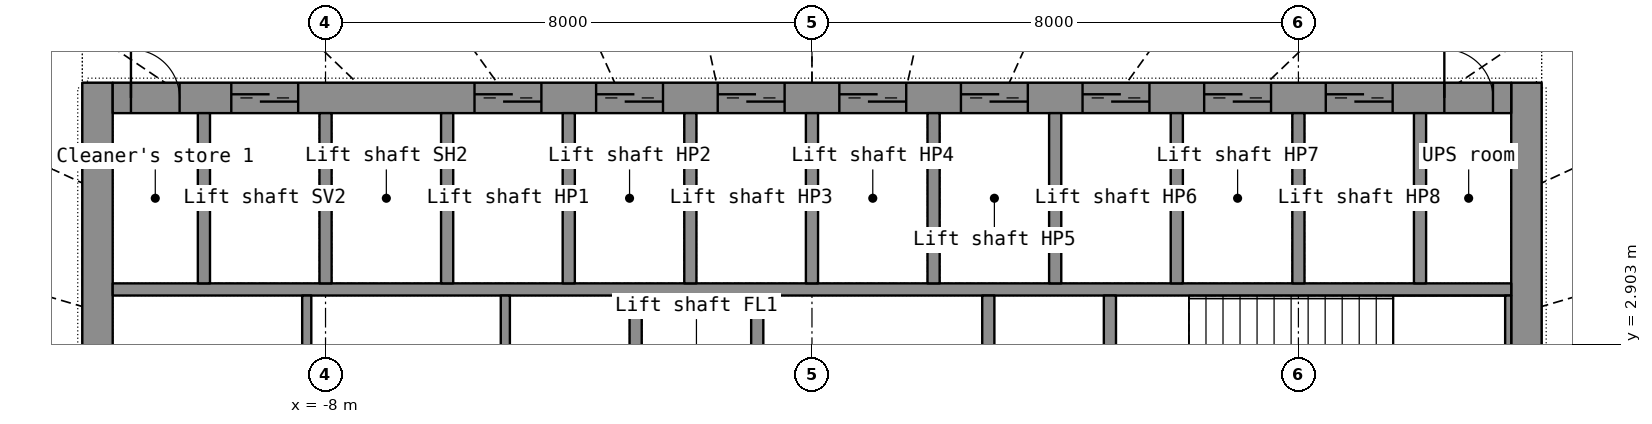
"""IFC4 building model, lengths in metres.
Left out: names, types, materials, properties, quantities, classifications, styles, units other than length and angle.
Written with IfcOpenShell. Run it as: python <this file> out.ifc"""

import sys

from ifc_helpers import new_model, si_unit, direction, frame, frame_2d, origin, place, context, subcontext, project, spatial, rectangle, extrude, element, fill, save


model = new_model("IFC4")
c1 = context("Model", 3, precision=1e-05, world=origin(), true_north=direction((0.0, 1.0)))
c2 = subcontext(c1, "Body", "Model", "MODEL_VIEW")
j1 = project(units=[si_unit("LENGTHUNIT", "METRE"), si_unit("PLANEANGLEUNIT", "RADIAN")], contexts=[c1])
p1 = place(None, origin())
s1 = spatial("IfcSite", under=j1, at=p1, CompositionType="ELEMENT")
p2 = place(p1, origin())
s2 = spatial("IfcBuilding", under=s1, at=p2, CompositionType="ELEMENT")
p3 = place(p2, frame((0.0, 0.0, 152.6)))
s3 = spatial("IfcBuildingStorey", under=s2, at=p3, CompositionType="ELEMENT", Elevation=152.6)
p4 = place(p3, frame((-11.75, -7.2, 0.0), z_axis=(0.0, 0.0, 1.0), x_axis=(0.0, 1.0, 0.0)))
e1 = element("IfcWall", 1, at=p4, inside=s3, PredefinedType="SHEAR", context=c2, shape_type="SweptSolid", body=[
    extrude(rectangle(XDim=14.4, YDim=0.5, at=frame_2d((7.2, 0.0))), origin(), (0.0, 0.0, 1.0), 4.1),
])
p5 = place(p4, frame((6.5, 0.0, 0.0)))
e2 = element("IfcOpeningElement", 2, at=p5, cuts=e1, PredefinedType="OPENING", context=c2, shape_type="SweptSolid", body=[
    extrude(rectangle(XDim=1.4, YDim=2.2, at=frame_2d((0.7, 1.1))), frame((0.0, 0.26, 0.0), z_axis=(0.0, -1.0, 0.0), x_axis=(1.0, 0.0, 0.0)), (0.0, 0.0, 1.0), 0.52),
])
p6 = place(p3, frame((11.75, -7.2, 0.0), z_axis=(0.0, 0.0, 1.0), x_axis=(0.0, 1.0, 0.0)))
e3 = element("IfcWall", 3, at=p6, inside=s3, PredefinedType="SHEAR", context=c2, shape_type="SweptSolid", body=[
    extrude(rectangle(XDim=14.4, YDim=0.5, at=frame_2d((7.2, 0.0))), origin(), (0.0, 0.0, 1.0), 4.1),
])
p7 = place(p6, frame((6.5, 0.0, 0.0)))
e4 = element("IfcOpeningElement", 4, at=p7, cuts=e3, PredefinedType="OPENING", context=c2, shape_type="SweptSolid", body=[
    extrude(rectangle(XDim=1.4, YDim=2.2, at=frame_2d((0.7, 1.1))), frame((0.0, 0.26, 0.0), z_axis=(0.0, -1.0, 0.0), x_axis=(1.0, 0.0, 0.0)), (0.0, 0.0, 1.0), 0.52),
])
p8 = place(p3, frame((-11.5, 6.95, 0.0), z_axis=(0.0, 0.0, 1.0), x_axis=(1.0, 0.0, 0.0)))
e5 = element("IfcWall", 5, at=p8, inside=s3, PredefinedType="SHEAR", context=c2, shape_type="SweptSolid", body=[
    extrude(rectangle(XDim=23.0, YDim=0.5, at=frame_2d((11.5, 0.0))), origin(), (0.0, 0.0, 1.0), 4.1),
])
p9 = place(p8, frame((1.95, 0.0, 0.0)))
e6 = element("IfcOpeningElement", 6, at=p9, cuts=e5, PredefinedType="OPENING", context=c2, shape_type="SweptSolid", body=[
    extrude(rectangle(XDim=1.1, YDim=2.2, at=frame_2d((0.55, 1.1))), frame((0.0, 0.26, 0.0), z_axis=(0.0, -1.0, 0.0), x_axis=(1.0, 0.0, 0.0)), (0.0, 0.0, 1.0), 0.52),
])
p10 = place(p8, frame((5.95, 0.0, 0.0)))
e7 = element("IfcOpeningElement", 7, at=p10, cuts=e5, PredefinedType="OPENING", context=c2, shape_type="SweptSolid", body=[
    extrude(rectangle(XDim=1.1, YDim=2.2, at=frame_2d((0.55, 1.1))), frame((0.0, 0.26, 0.0), z_axis=(0.0, -1.0, 0.0), x_axis=(1.0, 0.0, 0.0)), (0.0, 0.0, 1.0), 0.52),
])
p11 = place(p8, frame((7.95, 0.0, 0.0)))
e8 = element("IfcOpeningElement", 8, at=p11, cuts=e5, PredefinedType="OPENING", context=c2, shape_type="SweptSolid", body=[
    extrude(rectangle(XDim=1.1, YDim=2.2, at=frame_2d((0.55, 1.1))), frame((0.0, 0.26, 0.0), z_axis=(0.0, -1.0, 0.0), x_axis=(1.0, 0.0, 0.0)), (0.0, 0.0, 1.0), 0.52),
])
p12 = place(p8, frame((9.95, 0.0, 0.0)))
e9 = element("IfcOpeningElement", 9, at=p12, cuts=e5, PredefinedType="OPENING", context=c2, shape_type="SweptSolid", body=[
    extrude(rectangle(XDim=1.1, YDim=2.2, at=frame_2d((0.55, 1.1))), frame((0.0, 0.26, 0.0), z_axis=(0.0, -1.0, 0.0), x_axis=(1.0, 0.0, 0.0)), (0.0, 0.0, 1.0), 0.52),
])
p13 = place(p8, frame((11.95, 0.0, 0.0)))
e10 = element("IfcOpeningElement", 10, at=p13, cuts=e5, PredefinedType="OPENING", context=c2, shape_type="SweptSolid", body=[
    extrude(rectangle(XDim=1.1, YDim=2.2, at=frame_2d((0.55, 1.1))), frame((0.0, 0.26, 0.0), z_axis=(0.0, -1.0, 0.0), x_axis=(1.0, 0.0, 0.0)), (0.0, 0.0, 1.0), 0.52),
])
p14 = place(p8, frame((13.95, 0.0, 0.0)))
e11 = element("IfcOpeningElement", 11, at=p14, cuts=e5, PredefinedType="OPENING", context=c2, shape_type="SweptSolid", body=[
    extrude(rectangle(XDim=1.1, YDim=2.2, at=frame_2d((0.55, 1.1))), frame((0.0, 0.26, 0.0), z_axis=(0.0, -1.0, 0.0), x_axis=(1.0, 0.0, 0.0)), (0.0, 0.0, 1.0), 0.52),
])
p15 = place(p8, frame((15.95, 0.0, 0.0)))
e12 = element("IfcOpeningElement", 12, at=p15, cuts=e5, PredefinedType="OPENING", context=c2, shape_type="SweptSolid", body=[
    extrude(rectangle(XDim=1.1, YDim=2.2, at=frame_2d((0.55, 1.1))), frame((0.0, 0.26, 0.0), z_axis=(0.0, -1.0, 0.0), x_axis=(1.0, 0.0, 0.0)), (0.0, 0.0, 1.0), 0.52),
])
p16 = place(p8, frame((17.95, 0.0, 0.0)))
e13 = element("IfcOpeningElement", 13, at=p16, cuts=e5, PredefinedType="OPENING", context=c2, shape_type="SweptSolid", body=[
    extrude(rectangle(XDim=1.1, YDim=2.2, at=frame_2d((0.55, 1.1))), frame((0.0, 0.26, 0.0), z_axis=(0.0, -1.0, 0.0), x_axis=(1.0, 0.0, 0.0)), (0.0, 0.0, 1.0), 0.52),
])
p17 = place(p8, frame((19.95, 0.0, 0.0)))
e14 = element("IfcOpeningElement", 14, at=p17, cuts=e5, PredefinedType="OPENING", context=c2, shape_type="SweptSolid", body=[
    extrude(rectangle(XDim=1.1, YDim=2.2, at=frame_2d((0.55, 1.1))), frame((0.0, 0.26, 0.0), z_axis=(0.0, -1.0, 0.0), x_axis=(1.0, 0.0, 0.0)), (0.0, 0.0, 1.0), 0.52),
])
p18 = place(p8, frame((0.3, 0.0, 0.0)))
e15 = element("IfcOpeningElement", 15, at=p18, cuts=e5, PredefinedType="OPENING", context=c2, shape_type="SweptSolid", body=[
    extrude(rectangle(XDim=0.8, YDim=2.05, at=frame_2d((0.4, 1.025))), frame((0.0, 0.26, 0.0), z_axis=(0.0, -1.0, 0.0), x_axis=(1.0, 0.0, 0.0)), (0.0, 0.0, 1.0), 0.52),
])
p19 = place(p8, frame((21.9, 0.0, 0.0)))
e16 = element("IfcOpeningElement", 16, at=p19, cuts=e5, PredefinedType="OPENING", context=c2, shape_type="SweptSolid", body=[
    extrude(rectangle(XDim=0.8, YDim=2.05, at=frame_2d((0.4, 1.025))), frame((0.0, 0.26, 0.0), z_axis=(0.0, -1.0, 0.0), x_axis=(1.0, 0.0, 0.0)), (0.0, 0.0, 1.0), 0.52),
])
p20 = place(p3, frame((-11.5, 3.8, 0.0), z_axis=(0.0, 0.0, 1.0), x_axis=(1.0, 0.0, 0.0)))
e17 = element("IfcWall", 17, at=p20, inside=s3, PredefinedType="SHEAR", context=c2, shape_type="SweptSolid", body=[
    extrude(rectangle(XDim=23.0, YDim=0.2, at=frame_2d((11.5, 0.0))), origin(), (0.0, 0.0, 1.0), 4.1),
])
for number, where, z_axis, x_axis in (
    (18, (-10.0, 3.9, 0.0), (0.0, 0.0, 1.0), (0.0, 1.0, 0.0)),
    (19, (-8.0, 3.9, 0.0), (0.0, 0.0, 1.0), (0.0, 1.0, 0.0)),
    (20, (-6.0, 3.9, 0.0), (0.0, 0.0, 1.0), (0.0, 1.0, 0.0)),
    (21, (-4.0, 3.9, 0.0), (0.0, 0.0, 1.0), (0.0, 1.0, 0.0)),
    (22, (-2.0, 3.9, 0.0), (0.0, 0.0, 1.0), (0.0, 1.0, 0.0)),
    (23, (0.0, 3.9, 0.0), (0.0, 0.0, 1.0), (0.0, 1.0, 0.0)),
    (24, (2.0, 3.9, 0.0), (0.0, 0.0, 1.0), (0.0, 1.0, 0.0)),
    (25, (4.0, 3.9, 0.0), (0.0, 0.0, 1.0), (0.0, 1.0, 0.0)),
    (26, (6.0, 3.9, 0.0), (0.0, 0.0, 1.0), (0.0, 1.0, 0.0)),
    (27, (8.0, 3.9, 0.0), (0.0, 0.0, 1.0), (0.0, 1.0, 0.0)),
    (28, (10.0, 3.9, 0.0), (0.0, 0.0, 1.0), (0.0, 1.0, 0.0)),
):
    element("IfcWall", number, at=place(p3, frame(where, z_axis=z_axis, x_axis=x_axis)), inside=s3, PredefinedType="SHEAR", context=c2, shape_type="SweptSolid", body=[
        extrude(rectangle(XDim=2.8, YDim=0.2, at=frame_2d((1.4, 0.0))), origin(), (0.0, 0.0, 1.0), 4.1),
    ])
p21 = place(p3, frame((-2.9, -3.7, 0.0), z_axis=(0.0, 0.0, 1.0), x_axis=(0.0, 1.0, 0.0)))
e29 = element("IfcWall", 29, at=p21, inside=s3, PredefinedType="SHEAR", context=c2, shape_type="SweptSolid", body=[
    extrude(rectangle(XDim=7.4, YDim=0.2, at=frame_2d((3.7, 0.0))), origin(), (0.0, 0.0, 1.0), 4.1),
])
p22 = place(p21, frame((3.1, 0.0, 0.0)))
e30 = element("IfcOpeningElement", 30, at=p22, cuts=e29, PredefinedType="OPENING", context=c2, shape_type="SweptSolid", body=[
    extrude(rectangle(XDim=1.2, YDim=2.2, at=frame_2d((0.6, 1.1))), frame((0.0, 0.11, 0.0), z_axis=(0.0, -1.0, 0.0), x_axis=(1.0, 0.0, 0.0)), (0.0, 0.0, 1.0), 0.22),
])
p23 = place(p3, frame((2.9, -3.7, 0.0), z_axis=(0.0, 0.0, 1.0), x_axis=(0.0, 1.0, 0.0)))
e31 = element("IfcWall", 31, at=p23, inside=s3, PredefinedType="SHEAR", context=c2, shape_type="SweptSolid", body=[
    extrude(rectangle(XDim=7.4, YDim=0.2, at=frame_2d((3.7, 0.0))), origin(), (0.0, 0.0, 1.0), 4.1),
])
p24 = place(p23, frame((3.1, 0.0, 0.0)))
e32 = element("IfcOpeningElement", 32, at=p24, cuts=e31, PredefinedType="OPENING", context=c2, shape_type="SweptSolid", body=[
    extrude(rectangle(XDim=1.2, YDim=2.2, at=frame_2d((0.6, 1.1))), frame((0.0, 0.11, 0.0), z_axis=(0.0, -1.0, 0.0), x_axis=(1.0, 0.0, 0.0)), (0.0, 0.0, 1.0), 0.22),
])
p25 = place(p3, frame((-0.9, 1.35, 0.0), z_axis=(0.0, 0.0, 1.0), x_axis=(0.0, 1.0, 0.0)))
e33 = element("IfcWall", 33, at=p25, inside=s3, PredefinedType="SHEAR", context=c2, shape_type="SweptSolid", body=[
    extrude(rectangle(XDim=2.35, YDim=0.2, at=frame_2d((1.175, 0.0))), origin(), (0.0, 0.0, 1.0), 4.1),
])
p26 = place(p3, frame((11.45, 1.35, 0.0), z_axis=(0.0, 0.0, 1.0), x_axis=(0.0, 1.0, 0.0)))
e34 = element("IfcWall", 34, at=p26, inside=s3, PredefinedType="SHEAR", context=c2, shape_type="SweptSolid", body=[
    extrude(rectangle(XDim=2.35, YDim=0.1, at=frame_2d((1.175, 0.0))), origin(), (0.0, 0.0, 1.0), 4.1),
])
p27 = place(p3, frame((4.9, 1.35, 0.0), z_axis=(0.0, 0.0, 1.0), x_axis=(0.0, 1.0, 0.0)))
e35 = element("IfcWall", 35, at=p27, inside=s3, PredefinedType="SHEAR", context=c2, shape_type="SweptSolid", body=[
    extrude(rectangle(XDim=2.35, YDim=0.2, at=frame_2d((1.175, 0.0))), origin(), (0.0, 0.0, 1.0), 4.1),
])
for number, where, z_axis, x_axis in (
    (36, (-8.309, 1.35, 0.0), (0.0, 0.0, 1.0), (0.0, 1.0, 0.0)),
    (37, (-5.043, 1.35, 0.0), (0.0, 0.0, 1.0), (0.0, 1.0, 0.0)),
):
    element("IfcWall", number, at=place(p3, frame(where, z_axis=z_axis, x_axis=x_axis)), inside=s3, PredefinedType="PARTITIONING", context=c2, shape_type="SweptSolid", body=[
        extrude(rectangle(XDim=2.35, YDim=0.15, at=frame_2d((1.175, 0.0))), origin(), (0.0, 0.0, 1.0), 4.1),
    ])
p28 = place(p9, origin())
e38 = element("IfcDoor", 38, at=p28, inside=s3, OperationType="DOUBLE_DOOR_SLIDING", PredefinedType="DOOR", context=c2, shape_type="SweptSolid", body=[
    extrude(rectangle(XDim=1.1, YDim=2.2, at=frame_2d((0.55, 1.1))), frame((0.0, 0.025, 0.0), z_axis=(0.0, -1.0, 0.0), x_axis=(1.0, 0.0, 0.0)), (0.0, 0.0, 1.0), 0.05),
])
fill(e6, e38)
p29 = place(p10, origin())
e39 = element("IfcDoor", 39, at=p29, inside=s3, OperationType="DOUBLE_DOOR_SLIDING", PredefinedType="DOOR", context=c2, shape_type="SweptSolid", body=[
    extrude(rectangle(XDim=1.1, YDim=2.2, at=frame_2d((0.55, 1.1))), frame((0.0, 0.025, 0.0), z_axis=(0.0, -1.0, 0.0), x_axis=(1.0, 0.0, 0.0)), (0.0, 0.0, 1.0), 0.05),
])
fill(e7, e39)
p30 = place(p11, origin())
e40 = element("IfcDoor", 40, at=p30, inside=s3, OperationType="DOUBLE_DOOR_SLIDING", PredefinedType="DOOR", context=c2, shape_type="SweptSolid", body=[
    extrude(rectangle(XDim=1.1, YDim=2.2, at=frame_2d((0.55, 1.1))), frame((0.0, 0.025, 0.0), z_axis=(0.0, -1.0, 0.0), x_axis=(1.0, 0.0, 0.0)), (0.0, 0.0, 1.0), 0.05),
])
fill(e8, e40)
p31 = place(p12, origin())
e41 = element("IfcDoor", 41, at=p31, inside=s3, OperationType="DOUBLE_DOOR_SLIDING", PredefinedType="DOOR", context=c2, shape_type="SweptSolid", body=[
    extrude(rectangle(XDim=1.1, YDim=2.2, at=frame_2d((0.55, 1.1))), frame((0.0, 0.025, 0.0), z_axis=(0.0, -1.0, 0.0), x_axis=(1.0, 0.0, 0.0)), (0.0, 0.0, 1.0), 0.05),
])
fill(e9, e41)
p32 = place(p13, origin())
e42 = element("IfcDoor", 42, at=p32, inside=s3, OperationType="DOUBLE_DOOR_SLIDING", PredefinedType="DOOR", context=c2, shape_type="SweptSolid", body=[
    extrude(rectangle(XDim=1.1, YDim=2.2, at=frame_2d((0.55, 1.1))), frame((0.0, 0.025, 0.0), z_axis=(0.0, -1.0, 0.0), x_axis=(1.0, 0.0, 0.0)), (0.0, 0.0, 1.0), 0.05),
])
fill(e10, e42)
p33 = place(p14, origin())
e43 = element("IfcDoor", 43, at=p33, inside=s3, OperationType="DOUBLE_DOOR_SLIDING", PredefinedType="DOOR", context=c2, shape_type="SweptSolid", body=[
    extrude(rectangle(XDim=1.1, YDim=2.2, at=frame_2d((0.55, 1.1))), frame((0.0, 0.025, 0.0), z_axis=(0.0, -1.0, 0.0), x_axis=(1.0, 0.0, 0.0)), (0.0, 0.0, 1.0), 0.05),
])
fill(e11, e43)
p34 = place(p15, origin())
e44 = element("IfcDoor", 44, at=p34, inside=s3, OperationType="DOUBLE_DOOR_SLIDING", PredefinedType="DOOR", context=c2, shape_type="SweptSolid", body=[
    extrude(rectangle(XDim=1.1, YDim=2.2, at=frame_2d((0.55, 1.1))), frame((0.0, 0.025, 0.0), z_axis=(0.0, -1.0, 0.0), x_axis=(1.0, 0.0, 0.0)), (0.0, 0.0, 1.0), 0.05),
])
fill(e12, e44)
p35 = place(p16, origin())
e45 = element("IfcDoor", 45, at=p35, inside=s3, OperationType="DOUBLE_DOOR_SLIDING", PredefinedType="DOOR", context=c2, shape_type="SweptSolid", body=[
    extrude(rectangle(XDim=1.1, YDim=2.2, at=frame_2d((0.55, 1.1))), frame((0.0, 0.025, 0.0), z_axis=(0.0, -1.0, 0.0), x_axis=(1.0, 0.0, 0.0)), (0.0, 0.0, 1.0), 0.05),
])
fill(e13, e45)
p36 = place(p17, origin())
e46 = element("IfcDoor", 46, at=p36, inside=s3, OperationType="DOUBLE_DOOR_SLIDING", PredefinedType="DOOR", context=c2, shape_type="SweptSolid", body=[
    extrude(rectangle(XDim=1.1, YDim=2.2, at=frame_2d((0.55, 1.1))), frame((0.0, 0.025, 0.0), z_axis=(0.0, -1.0, 0.0), x_axis=(1.0, 0.0, 0.0)), (0.0, 0.0, 1.0), 0.05),
])
fill(e14, e46)
p37 = place(p18, origin())
e47 = element("IfcDoor", 47, at=p37, inside=s3, OperationType="SINGLE_SWING_LEFT", PredefinedType="DOOR", context=c2, shape_type="SweptSolid", body=[
    extrude(rectangle(XDim=0.8, YDim=2.05, at=frame_2d((0.4, 1.025))), frame((0.0, 0.025, 0.0), z_axis=(0.0, -1.0, 0.0), x_axis=(1.0, 0.0, 0.0)), (0.0, 0.0, 1.0), 0.05),
])
fill(e15, e47)
p38 = place(p19, origin())
e48 = element("IfcDoor", 48, at=p38, inside=s3, OperationType="SINGLE_SWING_LEFT", PredefinedType="DOOR", context=c2, shape_type="SweptSolid", body=[
    extrude(rectangle(XDim=0.8, YDim=2.05, at=frame_2d((0.4, 1.025))), frame((0.0, 0.025, 0.0), z_axis=(0.0, -1.0, 0.0), x_axis=(1.0, 0.0, 0.0)), (0.0, 0.0, 1.0), 0.05),
])
fill(e16, e48)
save(model, sys.argv[1])
